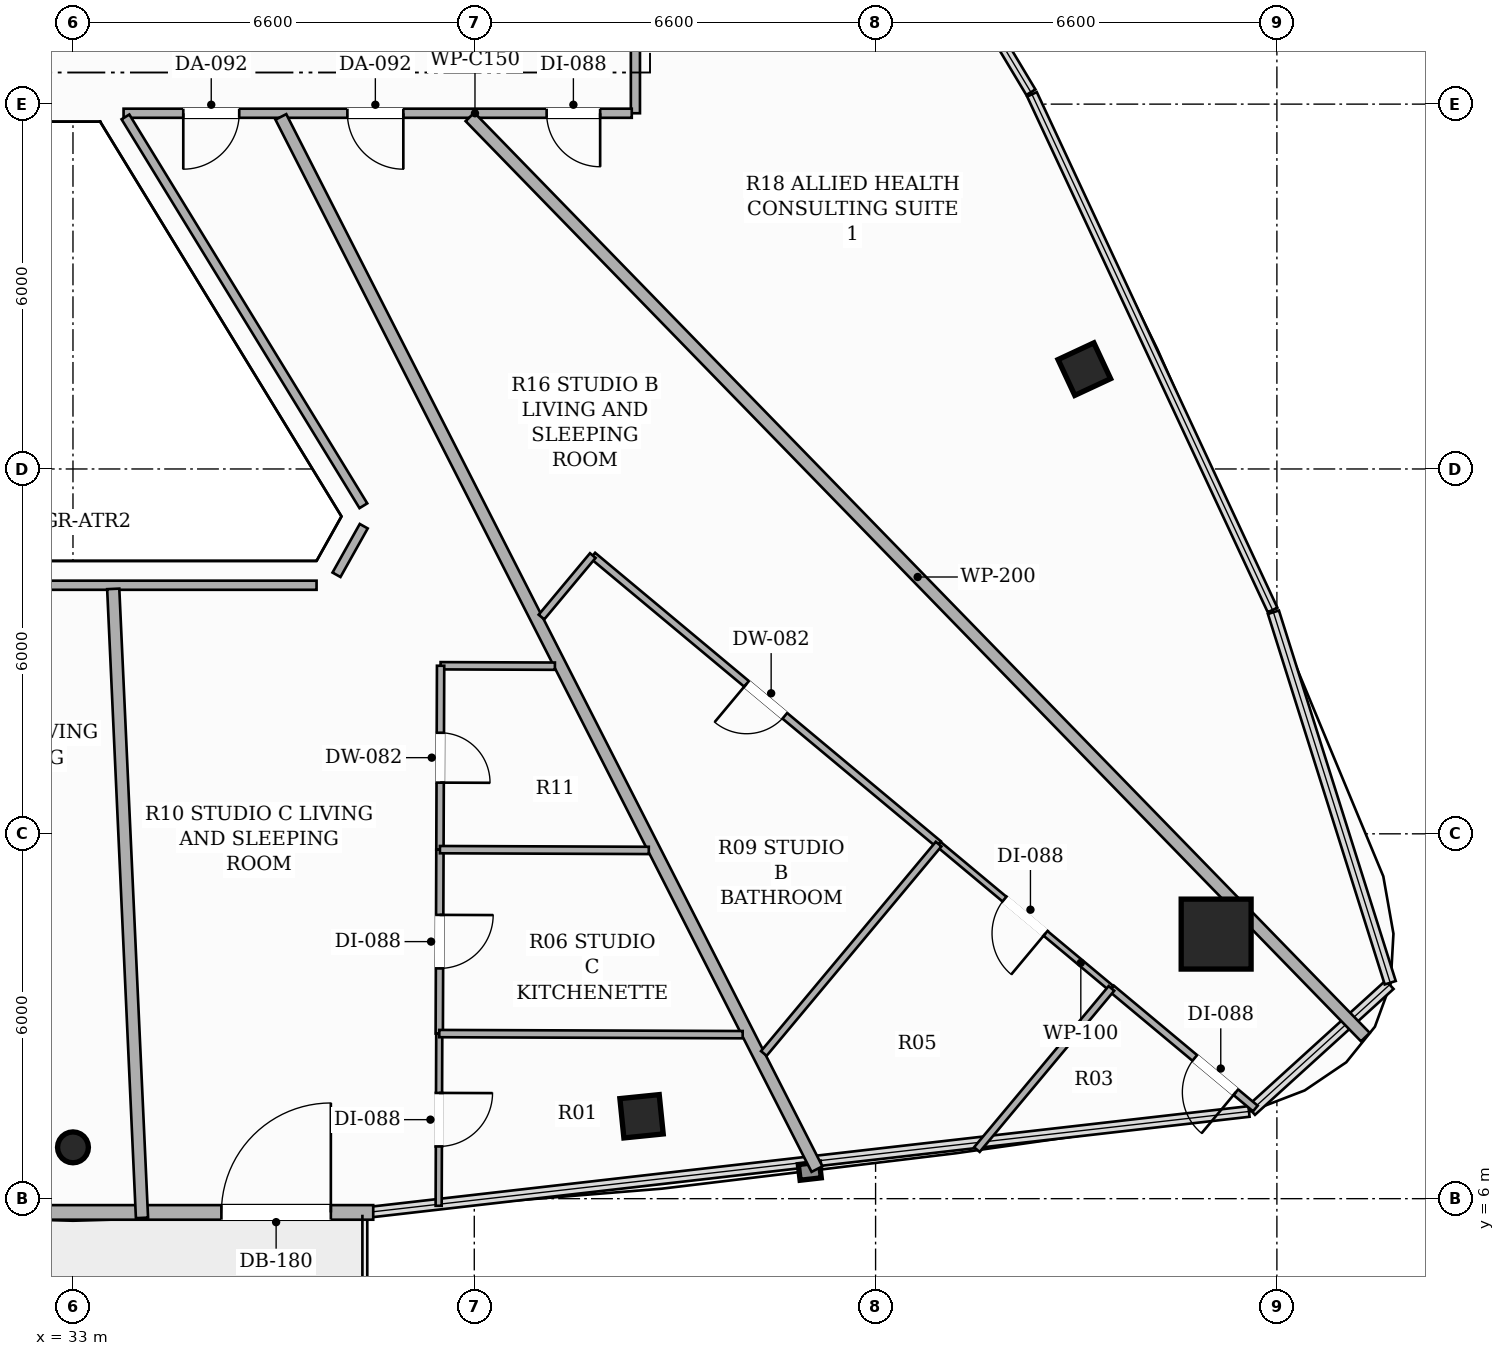
"""IFC4 building model, lengths in metres.
Left out: names, types, materials, properties, quantities, classifications, styles, units other than length and angle.
Written with IfcOpenShell. Run it as: python <this file> out.ifc"""

import sys

from ifc_helpers import new_model, si_unit, direction, frame, frame_2d, origin, origin_2d, place, context, subcontext, project, spatial, rectangle, hollow_rectangle, hollow_circle, extrude, element, fill, save


model = new_model("IFC4")
c1 = context("Model", 3, precision=1e-05, world=origin(), true_north=direction((0.0, 1.0)))
c2 = subcontext(c1, "Body", "Model", "MODEL_VIEW")
j1 = project(units=[si_unit("LENGTHUNIT", "METRE"), si_unit("PLANEANGLEUNIT", "RADIAN")], contexts=[c1])
p1 = place(None, origin())
s1 = spatial("IfcSite", under=j1, at=p1, CompositionType="ELEMENT")
p2 = place(p1, origin())
s2 = spatial("IfcBuilding", under=s1, at=p2, CompositionType="ELEMENT")
p3 = place(p2, frame((0.0, 0.0, 273.35)))
s3 = spatial("IfcBuildingStorey", under=s2, at=p3, CompositionType="ELEMENT", Elevation=273.35)
p4 = place(p3, frame((51.801, 10.351, 0.0), z_axis=(0.0, 0.0, 1.0), x_axis=(1.0, 0.0, 0.0)))
e1 = element("IfcColumn", 1, at=p4, inside=s3, PredefinedType="COLUMN", context=c2, shape_type="SweptSolid", body=[
    extrude(hollow_rectangle(XDim=1.15, YDim=1.15, WallThickness=0.036, at=origin_2d()), origin(), (0.0, 0.0, 1.0), 3.3),
])
p5 = place(p3, frame((33.0, 6.844, 0.0), z_axis=(0.0, 0.0, 1.0), x_axis=(1.0, 0.0, 0.0)))
e2 = element("IfcColumn", 2, at=p5, inside=s3, PredefinedType="COLUMN", context=c2, shape_type="SweptSolid", body=[
    extrude(hollow_circle(Radius=0.254, WallThickness=0.016, at=origin_2d()), origin(), (0.0, 0.0, 1.0), 3.3),
])
for number, where, z_axis, x_axis in (
    (3, (42.351, 7.355, 0.0), (0.0, 0.0, 1.0), (0.995, 0.101, 0.0)),
    (4, (49.633, 19.642, 0.0), (0.0, 0.0, 1.0), (-0.423, 0.906, 0.0)),
):
    element("IfcColumn", number, at=place(p3, frame(where, z_axis=z_axis, x_axis=x_axis)), inside=s3, PredefinedType="COLUMN", context=c2, shape_type="SweptSolid", body=[
        extrude(hollow_rectangle(XDim=0.65, YDim=0.65, WallThickness=0.022, at=origin_2d()), origin(), (0.0, 0.0, 1.0), 3.3),
    ])
p6 = place(p3, frame((28.062, 5.774, 0.0), z_axis=(0.0, 0.0, 1.0), x_axis=(1.0, 0.0, 0.0)))
e5 = element("IfcWall", 5, at=p6, inside=s3, PredefinedType="SOLIDWALL", context=c2, shape_type="SweptSolid", body=[
    extrude(rectangle(XDim=9.876, YDim=0.24, at=frame_2d((4.938, 0.0))), origin(), (0.0, 0.0, 1.0), 2.584),
])
p7 = place(p6, frame((7.379, 0.0, 0.0)))
e6 = element("IfcOpeningElement", 6, at=p7, cuts=e5, PredefinedType="OPENING", context=c2, shape_type="SweptSolid", body=[
    extrude(rectangle(XDim=1.8, YDim=2.2, at=frame_2d((0.9, 1.1))), frame((0.0, 0.13, 0.0), z_axis=(0.0, -1.0, 0.0), x_axis=(1.0, 0.0, 0.0)), (0.0, 0.0, 1.0), 0.26),
])
p8 = place(p3, frame((42.25, 26.59, 0.0), z_axis=(0.0, 0.0, 1.0), x_axis=(0.0, -1.0, 0.0)))
e7 = element("IfcWall", 7, at=p8, inside=s3, PredefinedType="PARTITIONING", context=c2, shape_type="SweptSolid", body=[
    extrude(rectangle(XDim=2.74, YDim=0.15, at=frame_2d((1.37, 0.0))), origin(), (0.0, 0.0, 1.0), 2.733),
])
p9 = place(p3, frame((42.19, 23.85, 0.0), z_axis=(0.0, 0.0, 1.0), x_axis=(-1.0, 0.0, 0.0)))
e8 = element("IfcWall", 8, at=p9, inside=s3, PredefinedType="PARTITIONING", context=c2, shape_type="SweptSolid", body=[
    extrude(rectangle(XDim=8.358, YDim=0.15, at=frame_2d((4.179, 0.0))), origin(), (0.0, 0.0, 1.0), 2.525),
])
p10 = place(p9, frame((0.52, 0.0, 0.0)))
e9 = element("IfcOpeningElement", 9, at=p10, cuts=e8, PredefinedType="OPENING", context=c2, shape_type="SweptSolid", body=[
    extrude(rectangle(XDim=0.88, YDim=2.1, at=frame_2d((0.44, 1.05))), frame((0.0, 0.085, 0.0), z_axis=(0.0, -1.0, 0.0), x_axis=(1.0, 0.0, 0.0)), (0.0, 0.0, 1.0), 0.17),
])
p11 = place(p9, frame((3.757, 0.0, 0.0)))
e10 = element("IfcOpeningElement", 10, at=p11, cuts=e8, PredefinedType="OPENING", context=c2, shape_type="SweptSolid", body=[
    extrude(rectangle(XDim=0.92, YDim=2.15, at=frame_2d((0.46, 1.075))), frame((0.0, 0.085, 0.0), z_axis=(0.0, -1.0, 0.0), x_axis=(1.0, 0.0, 0.0)), (0.0, 0.0, 1.0), 0.17),
])
p12 = place(p9, frame((6.456, 0.0, 0.0)))
e11 = element("IfcOpeningElement", 11, at=p12, cuts=e8, PredefinedType="OPENING", context=c2, shape_type="SweptSolid", body=[
    extrude(rectangle(XDim=0.92, YDim=2.15, at=frame_2d((0.46, 1.075))), frame((0.0, 0.085, 0.0), z_axis=(0.0, -1.0, 0.0), x_axis=(1.0, 0.0, 0.0)), (0.0, 0.0, 1.0), 0.17),
])
p13 = place(p3, frame((33.863, 23.79, 0.0), z_axis=(0.0, 0.0, 1.0), x_axis=(0.521913594497, -0.852998358661, 0.0)))
e12 = element("IfcWall", 12, at=p13, inside=s3, PredefinedType="PARTITIONING", context=c2, shape_type="SweptSolid", body=[
    extrude(rectangle(XDim=7.497, YDim=0.15, at=frame_2d((3.749, 0.0))), origin(), (0.0, 0.0, 1.0), 2.733),
])
p14 = place(p3, frame((37.782, 17.059, 0.0), z_axis=(0.0, 0.0, 1.0), x_axis=(-0.489033415255, -0.872265050752, 0.0)))
e13 = element("IfcWall", 13, at=p14, inside=s3, PredefinedType="PARTITIONING", context=c2, shape_type="SweptSolid", body=[
    extrude(rectangle(XDim=0.916, YDim=0.15, at=frame_2d((0.458, 0.0))), origin(), (0.0, 0.0, 1.0), 3.02),
])
p15 = place(p3, frame((37.006, 16.088, 0.0), z_axis=(0.0, 0.0, 1.0), x_axis=(-1.0, 0.0, 0.0)))
e14 = element("IfcWall", 14, at=p15, inside=s3, PredefinedType="PARTITIONING", context=c2, shape_type="SweptSolid", body=[
    extrude(rectangle(XDim=8.012, YDim=0.15, at=frame_2d((4.006, 0.0))), origin(), (0.0, 0.0, 1.0), 2.733),
])
p16 = place(p3, frame((54.255, 8.657, 0.0), z_axis=(0.0, 0.0, 1.0), x_axis=(-0.69739814005, 0.716683915164, 0.0)))
e15 = element("IfcWall", 15, at=p16, inside=s3, PredefinedType="PARTITIONING", context=c2, shape_type="SweptSolid", body=[
    extrude(rectangle(XDim=21.115, YDim=0.2, at=frame_2d((10.558, 0.0))), origin(), (0.0, 0.0, 1.0), 2.452),
])
p17 = place(p3, frame((45.236, 6.486, 0.0), z_axis=(0.0, 0.0, 1.0), x_axis=(-0.454004119661, 0.890999584361, 0.0)))
e16 = element("IfcWall", 16, at=p17, inside=s3, PredefinedType="PARTITIONING", context=c2, shape_type="SweptSolid", body=[
    extrude(rectangle(XDim=19.421, YDim=0.2, at=frame_2d((9.71, 0.0))), origin(), (0.0, 0.0, 1.0), 2.452),
])
p18 = place(p3, frame((34.135, 5.684, 0.0), z_axis=(0.0, 0.0, 1.0), x_axis=(-0.045669685987, 0.998956595545, 0.0)))
e17 = element("IfcWall", 17, at=p18, inside=s3, PredefinedType="PARTITIONING", context=c2, shape_type="SweptSolid", body=[
    extrude(rectangle(XDim=10.355, YDim=0.2, at=frame_2d((5.177, 0.0))), origin(), (0.0, 0.0, 1.0), 2.452),
])
p19 = place(p3, frame((47.236, 11.831, 0.0), z_axis=(0.0, 0.0, 1.0), x_axis=(-0.767842880201, 0.640638206264, 0.0)))
e18 = element("IfcWall", 18, at=p19, inside=s3, PredefinedType="PARTITIONING", context=c2, shape_type="SweptSolid", body=[
    extrude(rectangle(XDim=7.406, YDim=0.12, at=frame_2d((3.703, 0.0))), origin(), (0.0, 0.0, 1.0), 2.733),
])
p20 = place(p19, frame((3.293, 0.0, 0.0)))
e19 = element("IfcOpeningElement", 19, at=p20, cuts=e18, PredefinedType="OPENING", context=c2, shape_type="SweptSolid", body=[
    extrude(rectangle(XDim=0.82, YDim=2.1, at=frame_2d((0.41, 1.05))), frame((0.0, 0.07, 0.0), z_axis=(0.0, -1.0, 0.0), x_axis=(1.0, 0.0, 0.0)), (0.0, 0.0, 1.0), 0.14),
])
p21 = place(p3, frame((41.549, 16.576, 0.0), z_axis=(0.0, 0.0, 1.0), x_axis=(-0.640858814593, -0.767658765181, 0.0)))
e20 = element("IfcWall", 20, at=p21, inside=s3, PredefinedType="PARTITIONING", context=c2, shape_type="SweptSolid", body=[
    extrude(rectangle(XDim=1.317, YDim=0.12, at=frame_2d((0.658, 0.0))), origin(), (0.0, 0.0, 1.0), 2.733),
])
p22 = place(p3, frame((52.446, 7.483, 0.0), z_axis=(0.0, 0.0, 1.0), x_axis=(-0.76779917016, 0.640690591707, 0.0)))
e21 = element("IfcWall", 21, at=p22, inside=s3, PredefinedType="PARTITIONING", context=c2, shape_type="SweptSolid", body=[
    extrude(rectangle(XDim=3.083, YDim=0.12, at=frame_2d((1.542, 0.0))), origin(), (0.0, 0.0, 1.0), 2.452),
])
p23 = place(p22, frame((0.418, 0.0, 0.0)))
e22 = element("IfcOpeningElement", 22, at=p23, cuts=e21, PredefinedType="OPENING", context=c2, shape_type="SweptSolid", body=[
    extrude(rectangle(XDim=0.88, YDim=2.1, at=frame_2d((0.44, 1.05))), frame((0.0, 0.07, 0.0), z_axis=(0.0, -1.0, 0.0), x_axis=(1.0, 0.0, 0.0)), (0.0, 0.0, 1.0), 0.14),
])
p24 = place(p3, frame((50.079, 9.458, 0.0), z_axis=(0.0, 0.0, 1.0), x_axis=(-0.767707674805, 0.640800223195, 0.0)))
e23 = element("IfcWall", 23, at=p24, inside=s3, PredefinedType="PARTITIONING", context=c2, shape_type="SweptSolid", body=[
    extrude(rectangle(XDim=3.703, YDim=0.1, at=frame_2d((1.852, 0.0))), origin(), (0.0, 0.0, 1.0), 2.452),
])
p25 = place(p24, frame((1.412, 0.0, 0.0)))
e24 = element("IfcOpeningElement", 24, at=p25, cuts=e23, PredefinedType="OPENING", context=c2, shape_type="SweptSolid", body=[
    extrude(rectangle(XDim=0.88, YDim=2.1, at=frame_2d((0.44, 1.05))), frame((0.0, 0.06, 0.0), z_axis=(0.0, -1.0, 0.0), x_axis=(1.0, 0.0, 0.0)), (0.0, 0.0, 1.0), 0.12),
])
p26 = place(p3, frame((47.236, 11.831, 0.0), z_axis=(0.0, 0.0, 1.0), x_axis=(-0.640810637278, -0.767698982122, 0.0)))
e25 = element("IfcWall", 25, at=p26, inside=s3, PredefinedType="PARTITIONING", context=c2, shape_type="SweptSolid", body=[
    extrude(rectangle(XDim=4.485, YDim=0.12, at=frame_2d((2.242, 0.0))), origin(), (0.0, 0.0, 1.0), 2.452),
])
p27 = place(p3, frame((47.866, 6.807, 0.0), z_axis=(0.0, 0.0, 1.0), x_axis=(0.640844750015, 0.767670506388, 0.0)))
e26 = element("IfcWall", 26, at=p27, inside=s3, PredefinedType="PARTITIONING", context=c2, shape_type="SweptSolid", body=[
    extrude(rectangle(XDim=3.453, YDim=0.12, at=frame_2d((1.727, 0.0))), origin(), (0.0, 0.0, 1.0), 2.452),
])
p28 = place(p3, frame((40.926, 14.757, 0.0), z_axis=(0.0, 0.0, 1.0), x_axis=(-0.999993390212, 0.00363586741, 0.0)))
e27 = element("IfcWall", 27, at=p28, inside=s3, PredefinedType="PARTITIONING", context=c2, shape_type="SweptSolid", body=[
    extrude(rectangle(XDim=1.88, YDim=0.12, at=frame_2d((0.94, 0.0))), origin(), (0.0, 0.0, 1.0), 2.733),
])
p29 = place(p3, frame((39.046, 14.764, 0.0), z_axis=(0.0, 0.0, 1.0), x_axis=(-0.003633110206, -0.999993400233, 0.0)))
e28 = element("IfcWall", 28, at=p29, inside=s3, PredefinedType="PARTITIONING", context=c2, shape_type="SweptSolid", body=[
    extrude(rectangle(XDim=3.024, YDim=0.12, at=frame_2d((1.512, 0.0))), origin(), (0.0, 0.0, 1.0), 3.02),
])
p30 = place(p29, frame((1.102, 0.0, 0.0)))
e29 = element("IfcOpeningElement", 29, at=p30, cuts=e28, PredefinedType="OPENING", context=c2, shape_type="SweptSolid", body=[
    extrude(rectangle(XDim=0.82, YDim=2.1, at=frame_2d((0.41, 1.05))), frame((0.0, 0.07, 0.0), z_axis=(0.0, -1.0, 0.0), x_axis=(1.0, 0.0, 0.0)), (0.0, 0.0, 1.0), 0.14),
])
p31 = place(p3, frame((39.035, 11.74, 0.0), z_axis=(0.0, 0.0, 1.0), x_axis=(-0.003631937304, -0.999993404494, 0.0)))
e30 = element("IfcWall", 30, at=p31, inside=s3, PredefinedType="PARTITIONING", context=c2, shape_type="SweptSolid", body=[
    extrude(rectangle(XDim=3.025, YDim=0.12, at=frame_2d((1.512, 0.0))), origin(), (0.0, 0.0, 1.0), 3.02),
])
p32 = place(p31, frame((1.073, 0.0, 0.0)))
e31 = element("IfcOpeningElement", 31, at=p32, cuts=e30, PredefinedType="OPENING", context=c2, shape_type="SweptSolid", body=[
    extrude(rectangle(XDim=0.88, YDim=2.1, at=frame_2d((0.44, 1.05))), frame((0.0, 0.07, 0.0), z_axis=(0.0, -1.0, 0.0), x_axis=(1.0, 0.0, 0.0)), (0.0, 0.0, 1.0), 0.14),
])
p33 = place(p3, frame((39.024, 8.715, 0.0), z_axis=(0.0, 0.0, 1.0), x_axis=(-0.003534460681, -0.999993753774, 0.0)))
e32 = element("IfcWall", 32, at=p33, inside=s3, PredefinedType="PARTITIONING", context=c2, shape_type="SweptSolid", body=[
    extrude(rectangle(XDim=2.832, YDim=0.1, at=frame_2d((1.416, 0.0))), origin(), (0.0, 0.0, 1.0), 2.452),
])
p34 = place(p33, frame((0.976, 0.0, 0.0)))
e33 = element("IfcOpeningElement", 33, at=p34, cuts=e32, PredefinedType="OPENING", context=c2, shape_type="SweptSolid", body=[
    extrude(rectangle(XDim=0.88, YDim=2.1, at=frame_2d((0.44, 1.05))), frame((0.0, 0.06, 0.0), z_axis=(0.0, -1.0, 0.0), x_axis=(1.0, 0.0, 0.0)), (0.0, 0.0, 1.0), 0.12),
])
p35 = place(p3, frame((42.47, 11.727, 0.0), z_axis=(0.0, 0.0, 1.0), x_axis=(-0.999992905383, 0.003766853162, 0.0)))
e34 = element("IfcWall", 34, at=p35, inside=s3, PredefinedType="PARTITIONING", context=c2, shape_type="SweptSolid", body=[
    extrude(rectangle(XDim=3.435, YDim=0.12, at=frame_2d((1.718, 0.0))), origin(), (0.0, 0.0, 1.0), 2.733),
])
p36 = place(p3, frame((44.014, 8.697, 0.0), z_axis=(0.0, 0.0, 1.0), x_axis=(-0.999993445948, 0.003620505651, 0.0)))
e35 = element("IfcWall", 35, at=p36, inside=s3, PredefinedType="PARTITIONING", context=c2, shape_type="SweptSolid", body=[
    extrude(rectangle(XDim=4.99, YDim=0.12, at=frame_2d((2.495, 0.0))), origin(), (0.0, 0.0, 1.0), 2.733),
])
p37 = place(p7, origin())
e36 = element("IfcDoor", 36, at=p37, inside=s3, OperationType="SINGLE_SWING_RIGHT", PredefinedType="DOOR", context=c2, shape_type="SweptSolid", body=[
    extrude(rectangle(XDim=1.8, YDim=2.2, at=frame_2d((0.9, 1.1))), frame((0.0, 0.025, 0.0), z_axis=(0.0, -1.0, 0.0), x_axis=(1.0, 0.0, 0.0)), (0.0, 0.0, 1.0), 0.05),
])
fill(e6, e36)
p38 = place(p10, origin())
e37 = element("IfcDoor", 37, at=p38, inside=s3, OperationType="SINGLE_SWING_LEFT", PredefinedType="DOOR", context=c2, shape_type="SweptSolid", body=[
    extrude(rectangle(XDim=0.88, YDim=2.1, at=frame_2d((0.44, 1.05))), frame((0.0, 0.025, 0.0), z_axis=(0.0, -1.0, 0.0), x_axis=(1.0, 0.0, 0.0)), (0.0, 0.0, 1.0), 0.05),
])
fill(e9, e37)
p39 = place(p11, origin())
e38 = element("IfcDoor", 38, at=p39, inside=s3, OperationType="SINGLE_SWING_LEFT", PredefinedType="DOOR", context=c2, shape_type="SweptSolid", body=[
    extrude(rectangle(XDim=0.92, YDim=2.15, at=frame_2d((0.46, 1.075))), frame((0.0, 0.025, 0.0), z_axis=(0.0, -1.0, 0.0), x_axis=(1.0, 0.0, 0.0)), (0.0, 0.0, 1.0), 0.05),
])
fill(e10, e38)
p40 = place(p20, origin())
e39 = element("IfcDoor", 39, at=p40, inside=s3, OperationType="SINGLE_SWING_RIGHT", PredefinedType="DOOR", context=c2, shape_type="SweptSolid", body=[
    extrude(rectangle(XDim=0.82, YDim=2.1, at=frame_2d((0.41, 1.05))), frame((0.0, 0.025, 0.0), z_axis=(0.0, -1.0, 0.0), x_axis=(1.0, 0.0, 0.0)), (0.0, 0.0, 1.0), 0.05),
])
fill(e19, e39)
p41 = place(p23, origin())
e40 = element("IfcDoor", 40, at=p41, inside=s3, OperationType="SINGLE_SWING_LEFT", PredefinedType="DOOR", context=c2, shape_type="SweptSolid", body=[
    extrude(rectangle(XDim=0.88, YDim=2.1, at=frame_2d((0.44, 1.05))), frame((0.0, 0.025, 0.0), z_axis=(0.0, -1.0, 0.0), x_axis=(1.0, 0.0, 0.0)), (0.0, 0.0, 1.0), 0.05),
])
fill(e22, e40)
p42 = place(p25, origin())
e41 = element("IfcDoor", 41, at=p42, inside=s3, OperationType="SINGLE_SWING_LEFT", PredefinedType="DOOR", context=c2, shape_type="SweptSolid", body=[
    extrude(rectangle(XDim=0.88, YDim=2.1, at=frame_2d((0.44, 1.05))), frame((0.0, 0.025, 0.0), z_axis=(0.0, -1.0, 0.0), x_axis=(1.0, 0.0, 0.0)), (0.0, 0.0, 1.0), 0.05),
])
fill(e24, e41)
p43 = place(p12, origin())
e42 = element("IfcDoor", 42, at=p43, inside=s3, OperationType="SINGLE_SWING_RIGHT", PredefinedType="DOOR", context=c2, shape_type="SweptSolid", body=[
    extrude(rectangle(XDim=0.92, YDim=2.15, at=frame_2d((0.46, 1.075))), frame((0.0, 0.025, 0.0), z_axis=(0.0, -1.0, 0.0), x_axis=(1.0, 0.0, 0.0)), (0.0, 0.0, 1.0), 0.05),
])
fill(e11, e42)
p44 = place(p30, origin())
e43 = element("IfcDoor", 43, at=p44, inside=s3, OperationType="SINGLE_SWING_RIGHT", PredefinedType="DOOR", context=c2, shape_type="SweptSolid", body=[
    extrude(rectangle(XDim=0.82, YDim=2.1, at=frame_2d((0.41, 1.05))), frame((0.0, 0.025, 0.0), z_axis=(0.0, -1.0, 0.0), x_axis=(1.0, 0.0, 0.0)), (0.0, 0.0, 1.0), 0.05),
])
fill(e29, e43)
p45 = place(p32, origin())
e44 = element("IfcDoor", 44, at=p45, inside=s3, OperationType="SINGLE_SWING_LEFT", PredefinedType="DOOR", context=c2, shape_type="SweptSolid", body=[
    extrude(rectangle(XDim=0.88, YDim=2.1, at=frame_2d((0.44, 1.05))), frame((0.0, 0.025, 0.0), z_axis=(0.0, -1.0, 0.0), x_axis=(1.0, 0.0, 0.0)), (0.0, 0.0, 1.0), 0.05),
])
fill(e31, e44)
p46 = place(p34, origin())
e45 = element("IfcDoor", 45, at=p46, inside=s3, OperationType="SINGLE_SWING_LEFT", PredefinedType="DOOR", context=c2, shape_type="SweptSolid", body=[
    extrude(rectangle(XDim=0.88, YDim=2.1, at=frame_2d((0.44, 1.05))), frame((0.0, 0.025, 0.0), z_axis=(0.0, -1.0, 0.0), x_axis=(1.0, 0.0, 0.0)), (0.0, 0.0, 1.0), 0.05),
])
fill(e33, e45)
save(model, sys.argv[1])
